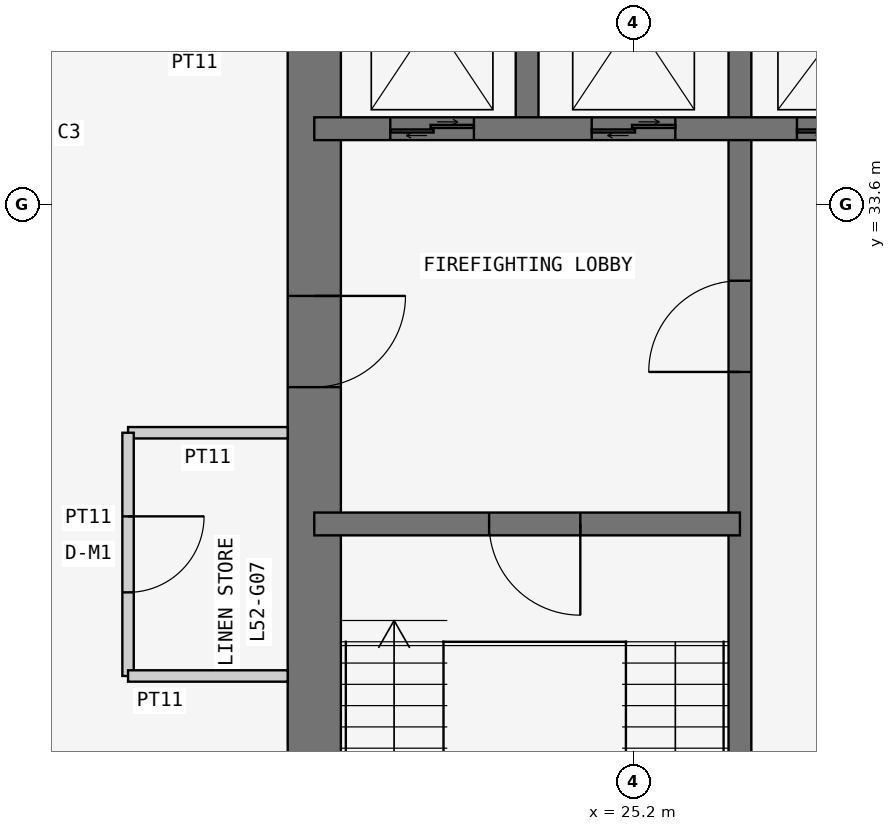
"""IFC4 building model, lengths in metres.
Left out: names, types, materials, properties, quantities, classifications, styles, units other than length and angle.
Written with IfcOpenShell. Run it as: python <this file> out.ifc"""

import sys

from ifc_helpers import new_model, si_unit, direction, frame, frame_2d, origin, place, context, subcontext, project, spatial, rectangle, extrude, element, fill, save


model = new_model("IFC4")
c1 = context("Model", 3, precision=1e-05, world=origin(), true_north=direction((0.0, 1.0)))
c2 = subcontext(c1, "Body", "Model", "MODEL_VIEW")
j1 = project(units=[si_unit("LENGTHUNIT", "METRE"), si_unit("PLANEANGLEUNIT", "RADIAN")], contexts=[c1])
p1 = place(None, origin())
s1 = spatial("IfcSite", under=j1, at=p1, CompositionType="ELEMENT")
p2 = place(p1, origin())
s2 = spatial("IfcBuilding", under=s1, at=p2, CompositionType="ELEMENT")
p3 = place(p2, frame((0.0, 0.0, 201.3)))
s3 = spatial("IfcBuildingStorey", under=s2, at=p3, CompositionType="ELEMENT", Elevation=201.3)
p4 = place(p3, frame((21.0, 37.8, 0.0), z_axis=(0.0, 0.0, 1.0), x_axis=(0.0, -1.0, 0.0)))
e1 = element("IfcWall", 1, at=p4, inside=s3, PredefinedType="SHEAR", context=c2, shape_type="SweptSolid", body=[
    extrude(rectangle(XDim=17.15, YDim=0.7, at=frame_2d((8.575, 0.0))), origin(), (0.0, 0.0, 1.0), 3.6),
])
p5 = place(p4, frame((5.4, 0.0, 0.0)))
e2 = element("IfcOpeningElement", 2, at=p5, cuts=e1, PredefinedType="OPENING", context=c2, shape_type="SweptSolid", body=[
    extrude(rectangle(XDim=1.2, YDim=2.1, at=frame_2d((0.6, 1.05))), frame((0.0, 0.36, 0.0), z_axis=(0.0, -1.0, 0.0), x_axis=(1.0, 0.0, 0.0)), (0.0, 0.0, 1.0), 0.72),
])
p6 = place(p3, frame((26.6, 21.0, 0.0), z_axis=(0.0, 0.0, 1.0), x_axis=(0.0, 1.0, 0.0)))
e3 = element("IfcWall", 3, at=p6, inside=s3, PredefinedType="SHEAR", context=c2, shape_type="SweptSolid", body=[
    extrude(rectangle(XDim=16.8, YDim=0.3, at=frame_2d((8.4, 0.0))), origin(), (0.0, 0.0, 1.0), 3.6),
])
p7 = place(p6, frame((10.4, 0.0, 0.0)))
e4 = element("IfcOpeningElement", 4, at=p7, cuts=e3, PredefinedType="OPENING", context=c2, shape_type="SweptSolid", body=[
    extrude(rectangle(XDim=1.2, YDim=2.1, at=frame_2d((0.6, 1.05))), frame((0.0, 0.16, 0.0), z_axis=(0.0, -1.0, 0.0), x_axis=(1.0, 0.0, 0.0)), (0.0, 0.0, 1.0), 0.32),
])
p8 = place(p3, frame((21.0, 29.4, 0.0), z_axis=(0.0, 0.0, 1.0), x_axis=(1.0, 0.0, 0.0)))
e5 = element("IfcWall", 5, at=p8, inside=s3, PredefinedType="SHEAR", context=c2, shape_type="SweptSolid", body=[
    extrude(rectangle(XDim=5.6, YDim=0.3, at=frame_2d((2.8, 0.0))), origin(), (0.0, 0.0, 1.0), 3.6),
])
p9 = place(p8, frame((2.3, 0.0, 0.0)))
e6 = element("IfcOpeningElement", 6, at=p9, cuts=e5, PredefinedType="OPENING", context=c2, shape_type="SweptSolid", body=[
    extrude(rectangle(XDim=1.2, YDim=2.1, at=frame_2d((0.6, 1.05))), frame((0.0, 0.16, 0.0), z_axis=(0.0, -1.0, 0.0), x_axis=(1.0, 0.0, 0.0)), (0.0, 0.0, 1.0), 0.32),
])
p10 = place(p3, frame((21.0, 34.6, 0.0), z_axis=(0.0, 0.0, 1.0), x_axis=(1.0, 0.0, 0.0)))
e7 = element("IfcWall", 7, at=p10, inside=s3, PredefinedType="SHEAR", context=c2, shape_type="SweptSolid", body=[
    extrude(rectangle(XDim=11.2, YDim=0.3, at=frame_2d((5.6, 0.0))), origin(), (0.0, 0.0, 1.0), 3.6),
])
p11 = place(p10, frame((9.25, 0.0, 0.0)))
e8 = element("IfcOpeningElement", 8, at=p11, cuts=e7, PredefinedType="OPENING", context=c2, shape_type="SweptSolid", body=[
    extrude(rectangle(XDim=1.1, YDim=2.1, at=frame_2d((0.55, 1.05))), frame((0.0, 0.16, 0.0), z_axis=(0.0, -1.0, 0.0), x_axis=(1.0, 0.0, 0.0)), (0.0, 0.0, 1.0), 0.32),
])
p12 = place(p10, frame((1.0, 0.0, 0.0)))
e9 = element("IfcOpeningElement", 9, at=p12, cuts=e7, PredefinedType="OPENING", context=c2, shape_type="SweptSolid", body=[
    extrude(rectangle(XDim=1.1, YDim=2.1, at=frame_2d((0.55, 1.05))), frame((0.0, 0.16, 0.0), z_axis=(0.0, -1.0, 0.0), x_axis=(1.0, 0.0, 0.0)), (0.0, 0.0, 1.0), 0.32),
])
p13 = place(p10, frame((3.65, 0.0, 0.0)))
e10 = element("IfcOpeningElement", 10, at=p13, cuts=e7, PredefinedType="OPENING", context=c2, shape_type="SweptSolid", body=[
    extrude(rectangle(XDim=1.1, YDim=2.1, at=frame_2d((0.55, 1.05))), frame((0.0, 0.16, 0.0), z_axis=(0.0, -1.0, 0.0), x_axis=(1.0, 0.0, 0.0)), (0.0, 0.0, 1.0), 0.32),
])
p14 = place(p10, frame((6.35, 0.0, 0.0)))
e11 = element("IfcOpeningElement", 11, at=p14, cuts=e7, PredefinedType="OPENING", context=c2, shape_type="SweptSolid", body=[
    extrude(rectangle(XDim=1.3, YDim=2.1, at=frame_2d((0.65, 1.05))), frame((0.0, 0.16, 0.0), z_axis=(0.0, -1.0, 0.0), x_axis=(1.0, 0.0, 0.0)), (0.0, 0.0, 1.0), 0.32),
])
p15 = place(p3, frame((23.8, 34.6, 0.0), z_axis=(0.0, 0.0, 1.0), x_axis=(0.0, 1.0, 0.0)))
e12 = element("IfcWall", 12, at=p15, inside=s3, PredefinedType="SHEAR", context=c2, shape_type="SweptSolid", body=[
    extrude(rectangle(XDim=3.2, YDim=0.3, at=frame_2d((1.6, 0.0))), origin(), (0.0, 0.0, 1.0), 3.6),
])
p16 = place(p3, frame((20.65, 30.6, 0.0), z_axis=(0.0, 0.0, 1.0), x_axis=(-1.0, 0.0, 0.0)))
e13 = element("IfcWall", 13, at=p16, inside=s3, PredefinedType="PARTITIONING", context=c2, shape_type="SweptSolid", body=[
    extrude(rectangle(XDim=2.1, YDim=0.15, at=frame_2d((1.05, 0.0))), origin(), (0.0, 0.0, 1.0), 3.45),
])
p17 = place(p3, frame((18.55, 30.6, 0.0), z_axis=(0.0, 0.0, 1.0), x_axis=(0.0, -1.0, 0.0)))
e14 = element("IfcWall", 14, at=p17, inside=s3, PredefinedType="PARTITIONING", context=c2, shape_type="SweptSolid", body=[
    extrude(rectangle(XDim=3.2, YDim=0.15, at=frame_2d((1.6, 0.0))), origin(), (0.0, 0.0, 1.0), 3.45),
])
p18 = place(p17, frame((1.1, 0.0, 0.0)))
e15 = element("IfcOpeningElement", 15, at=p18, cuts=e14, PredefinedType="OPENING", context=c2, shape_type="SweptSolid", body=[
    extrude(rectangle(XDim=1.0, YDim=2.1, at=frame_2d((0.5, 1.05))), frame((0.0, 0.085, 0.0), z_axis=(0.0, -1.0, 0.0), x_axis=(1.0, 0.0, 0.0)), (0.0, 0.0, 1.0), 0.17),
])
p19 = place(p3, frame((18.55, 27.4, 0.0), z_axis=(0.0, 0.0, 1.0), x_axis=(1.0, 0.0, 0.0)))
e16 = element("IfcWall", 16, at=p19, inside=s3, PredefinedType="PARTITIONING", context=c2, shape_type="SweptSolid", body=[
    extrude(rectangle(XDim=2.1, YDim=0.15, at=frame_2d((1.05, 0.0))), origin(), (0.0, 0.0, 1.0), 3.45),
])
p20 = place(p18, origin())
e17 = element("IfcDoor", 17, at=p20, inside=s3, OperationType="SINGLE_SWING_LEFT", PredefinedType="DOOR", context=c2, shape_type="SweptSolid", body=[
    extrude(rectangle(XDim=1.0, YDim=2.1, at=frame_2d((0.5, 1.05))), frame((0.0, 0.025, 0.0), z_axis=(0.0, -1.0, 0.0), x_axis=(1.0, 0.0, 0.0)), (0.0, 0.0, 1.0), 0.05),
])
fill(e15, e17)
p21 = place(p5, origin())
e18 = element("IfcDoor", 18, at=p21, inside=s3, OperationType="SINGLE_SWING_LEFT", PredefinedType="DOOR", context=c2, shape_type="SweptSolid", body=[
    extrude(rectangle(XDim=1.2, YDim=2.1, at=frame_2d((0.6, 1.05))), frame((0.0, 0.025, 0.0), z_axis=(0.0, -1.0, 0.0), x_axis=(1.0, 0.0, 0.0)), (0.0, 0.0, 1.0), 0.05),
])
fill(e2, e18)
p22 = place(p9, frame((1.2, 0.0, 0.0), z_axis=(0.0, 0.0, 1.0), x_axis=(-1.0, 0.0, 0.0)))
e19 = element("IfcDoor", 19, at=p22, inside=s3, OperationType="SINGLE_SWING_LEFT", PredefinedType="DOOR", context=c2, shape_type="SweptSolid", body=[
    extrude(rectangle(XDim=1.2, YDim=2.1, at=frame_2d((0.6, 1.05))), frame((0.0, 0.025, 0.0), z_axis=(0.0, -1.0, 0.0), x_axis=(1.0, 0.0, 0.0)), (0.0, 0.0, 1.0), 0.05),
])
fill(e6, e19)
p23 = place(p7, origin())
e20 = element("IfcDoor", 20, at=p23, inside=s3, OperationType="SINGLE_SWING_LEFT", PredefinedType="DOOR", context=c2, shape_type="SweptSolid", body=[
    extrude(rectangle(XDim=1.2, YDim=2.1, at=frame_2d((0.6, 1.05))), frame((0.0, 0.025, 0.0), z_axis=(0.0, -1.0, 0.0), x_axis=(1.0, 0.0, 0.0)), (0.0, 0.0, 1.0), 0.05),
])
fill(e4, e20)
p24 = place(p12, origin())
e21 = element("IfcDoor", 21, at=p24, inside=s3, OperationType="DOUBLE_DOOR_SLIDING", PredefinedType="DOOR", context=c2, shape_type="SweptSolid", body=[
    extrude(rectangle(XDim=1.1, YDim=2.1, at=frame_2d((0.55, 1.05))), frame((0.0, 0.025, 0.0), z_axis=(0.0, -1.0, 0.0), x_axis=(1.0, 0.0, 0.0)), (0.0, 0.0, 1.0), 0.05),
])
fill(e9, e21)
p25 = place(p13, origin())
e22 = element("IfcDoor", 22, at=p25, inside=s3, OperationType="DOUBLE_DOOR_SLIDING", PredefinedType="DOOR", context=c2, shape_type="SweptSolid", body=[
    extrude(rectangle(XDim=1.1, YDim=2.1, at=frame_2d((0.55, 1.05))), frame((0.0, 0.025, 0.0), z_axis=(0.0, -1.0, 0.0), x_axis=(1.0, 0.0, 0.0)), (0.0, 0.0, 1.0), 0.05),
])
fill(e10, e22)
p26 = place(p14, origin())
e23 = element("IfcDoor", 23, at=p26, inside=s3, OperationType="DOUBLE_DOOR_SLIDING", PredefinedType="DOOR", context=c2, shape_type="SweptSolid", body=[
    extrude(rectangle(XDim=1.3, YDim=2.1, at=frame_2d((0.65, 1.05))), frame((0.0, 0.025, 0.0), z_axis=(0.0, -1.0, 0.0), x_axis=(1.0, 0.0, 0.0)), (0.0, 0.0, 1.0), 0.05),
])
fill(e11, e23)
save(model, sys.argv[1])
